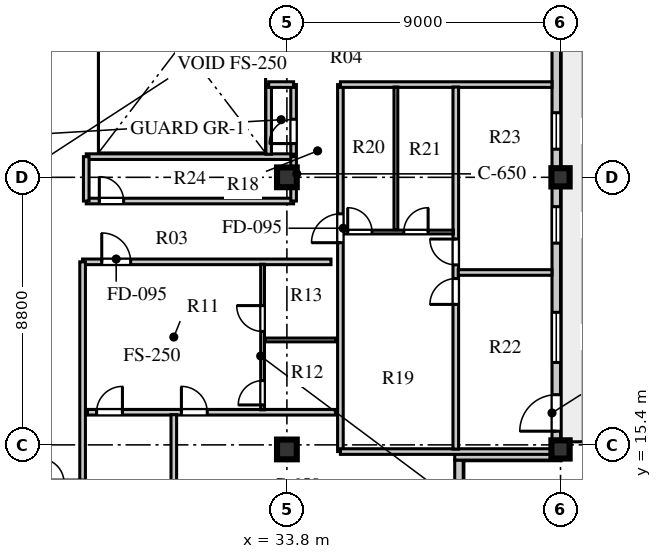
"""IFC4 building model, lengths in metres.
Left out: names, types, materials, properties, quantities, classifications, styles, units other than length and angle.
Written with IfcOpenShell. Run it as: python <this file> out.ifc"""

import sys

from ifc_helpers import new_model, si_unit, direction, frame, frame_2d, origin, origin_2d, place, context, subcontext, project, spatial, rectangle, extrude, element, fill, save


model = new_model("IFC4")
c1 = context("Model", 3, precision=1e-05, world=origin(), true_north=direction((0.0, 1.0)))
c2 = subcontext(c1, "Body", "Model", "MODEL_VIEW")
j1 = project(units=[si_unit("LENGTHUNIT", "METRE"), si_unit("PLANEANGLEUNIT", "RADIAN")], contexts=[c1])
p1 = place(None, origin())
s1 = spatial("IfcSite", under=j1, at=p1, CompositionType="ELEMENT")
p2 = place(p1, origin())
s2 = spatial("IfcBuilding", under=s1, at=p2, CompositionType="ELEMENT")
p3 = place(p2, frame((0.0, 0.0, 342.9)))
s3 = spatial("IfcBuildingStorey", under=s2, at=p3, CompositionType="ELEMENT", Elevation=342.9)
for number, where, z_axis, x_axis in (
    (1, (33.8, 15.25, 0.0), (0.0, 0.0, 1.0), (1.0, 0.0, 0.0)),
    (2, (33.8, 24.2, 0.0), (0.0, 0.0, 1.0), (1.0, 0.0, 0.0)),
):
    element("IfcColumn", number, at=place(p3, frame(where, z_axis=z_axis, x_axis=x_axis)), inside=s3, PredefinedType="COLUMN", context=c2, shape_type="SweptSolid", body=[
        extrude(rectangle(XDim=0.65, YDim=0.65, at=origin_2d()), origin(), (0.0, 0.0, 1.0), 3.55),
    ])
for number, where, z_axis, x_axis in (
    (3, (42.8, 15.25, 0.0), (0.0, 0.0, 1.0), (1.0, 0.0, 0.0)),
    (4, (42.8, 24.2, 0.0), (0.0, 0.0, 1.0), (1.0, 0.0, 0.0)),
):
    element("IfcColumn", number, at=place(p3, frame(where, z_axis=z_axis, x_axis=x_axis)), inside=s3, PredefinedType="COLUMN", context=c2, shape_type="SweptSolid", body=[
        extrude(rectangle(XDim=0.6, YDim=0.6, at=origin_2d()), origin(), (0.0, 0.0, 1.0), 3.55),
    ])
p4 = place(p3, frame((39.46, 11.98, 0.0), z_axis=(0.0, 0.0, 1.0), x_axis=(0.0, 1.0, 0.0)))
e5 = element("IfcWall", 5, at=p4, inside=s3, PredefinedType="STANDARD", context=c2, shape_type="SweptSolid", body=[
    extrude(rectangle(XDim=2.92, YDim=0.28, at=frame_2d((1.46, 0.0))), origin(), (0.0, 0.0, 1.0), 2.91),
])
p5 = place(p3, frame((39.32, 15.04, 0.0), z_axis=(0.0, 0.0, 1.0), x_axis=(1.0, 0.0, 0.0)))
e6 = element("IfcWall", 6, at=p5, inside=s3, PredefinedType="STANDARD", context=c2, shape_type="SweptSolid", body=[
    extrude(rectangle(XDim=3.48, YDim=0.28, at=frame_2d((1.74, 0.0))), origin(), (0.0, 0.0, 1.0), 2.91),
])
p6 = place(p3, frame((42.66, 15.18, 0.0), z_axis=(0.0, 0.0, 1.0), x_axis=(0.0, 1.0, 0.0)))
e7 = element("IfcWall", 7, at=p6, inside=s3, PredefinedType="STANDARD", context=c2, shape_type="SweptSolid", body=[
    extrude(rectangle(XDim=26.84, YDim=0.28, at=frame_2d((13.42, 0.0))), origin(), (0.0, 0.0, 1.0), 2.91),
])
p7 = place(p6, frame((0.67, 0.0, 0.0)))
e8 = element("IfcOpeningElement", 8, at=p7, cuts=e7, PredefinedType="OPENING", context=c2, shape_type="SweptSolid", body=[
    extrude(rectangle(XDim=1.2, YDim=2.05, at=frame_2d((0.6, 1.025))), frame((0.0, 0.15, 0.0), z_axis=(0.0, -1.0, 0.0), x_axis=(1.0, 0.0, 0.0)), (0.0, 0.0, 1.0), 0.3),
])
p8 = place(p6, frame((2.93, 0.0, 0.8)))
e9 = element("IfcOpeningElement", 9, at=p8, cuts=e7, PredefinedType="OPENING", context=c2, shape_type="SweptSolid", body=[
    extrude(rectangle(XDim=1.65, YDim=1.95, at=frame_2d((0.825, 0.975))), frame((0.0, 0.15, 0.0), z_axis=(0.0, -1.0, 0.0), x_axis=(1.0, 0.0, 0.0)), (0.0, 0.0, 1.0), 0.3),
])
p9 = place(p6, frame((6.855, 0.0, 0.8)))
e10 = element("IfcOpeningElement", 10, at=p9, cuts=e7, PredefinedType="OPENING", context=c2, shape_type="SweptSolid", body=[
    extrude(rectangle(XDim=1.2, YDim=1.75, at=frame_2d((0.6, 0.875))), frame((0.0, 0.15, 0.0), z_axis=(0.0, -1.0, 0.0), x_axis=(1.0, 0.0, 0.0)), (0.0, 0.0, 1.0), 0.3),
])
p10 = place(p6, frame((9.945, 0.0, 0.8)))
e11 = element("IfcOpeningElement", 11, at=p10, cuts=e7, PredefinedType="OPENING", context=c2, shape_type="SweptSolid", body=[
    extrude(rectangle(XDim=1.2, YDim=1.75, at=frame_2d((0.6, 0.875))), frame((0.0, 0.15, 0.0), z_axis=(0.0, -1.0, 0.0), x_axis=(1.0, 0.0, 0.0)), (0.0, 0.0, 1.0), 0.3),
])
p11 = place(p6, frame((14.85, 0.0, 0.8)))
e12 = element("IfcOpeningElement", 12, at=p11, cuts=e7, PredefinedType="OPENING", context=c2, shape_type="SweptSolid", body=[
    extrude(rectangle(XDim=1.8, YDim=2.0, at=frame_2d((0.9, 1.0))), frame((0.0, 0.15, 0.0), z_axis=(0.0, -1.0, 0.0), x_axis=(1.0, 0.0, 0.0)), (0.0, 0.0, 1.0), 0.3),
])
p12 = place(p6, frame((21.645, 0.0, 0.8)))
e13 = element("IfcOpeningElement", 13, at=p12, cuts=e7, PredefinedType="OPENING", context=c2, shape_type="SweptSolid", body=[
    extrude(rectangle(XDim=1.5, YDim=2.0, at=frame_2d((0.75, 1.0))), frame((0.0, 0.15, 0.0), z_axis=(0.0, -1.0, 0.0), x_axis=(1.0, 0.0, 0.0)), (0.0, 0.0, 1.0), 0.3),
])
p13 = place(p3, frame((27.08, 21.42, 0.0), z_axis=(0.0, 0.0, 1.0), x_axis=(1.0, 0.0, 0.0)))
e14 = element("IfcWall", 14, at=p13, inside=s3, PredefinedType="SOLIDWALL", context=c2, shape_type="SweptSolid", body=[
    extrude(rectangle(XDim=8.17, YDim=0.185, at=frame_2d((4.085, 0.0))), origin(), (0.0, 0.0, 1.0), 3.25),
])
p14 = place(p13, frame((0.63, 0.0, 0.0)))
e15 = element("IfcOpeningElement", 15, at=p14, cuts=e14, PredefinedType="OPENING", context=c2, shape_type="SweptSolid", body=[
    extrude(rectangle(XDim=0.95, YDim=2.1, at=frame_2d((0.475, 1.05))), frame((0.0, 0.103, 0.0), z_axis=(0.0, -1.0, 0.0), x_axis=(1.0, 0.0, 0.0)), (0.0, 0.0, 1.0), 0.205),
])
p15 = place(p3, frame((27.08, 11.98, 0.0), z_axis=(0.0, 0.0, 1.0), x_axis=(0.0, 1.0, 0.0)))
e16 = element("IfcWall", 16, at=p15, inside=s3, PredefinedType="SOLIDWALL", context=c2, shape_type="SweptSolid", body=[
    extrude(rectangle(XDim=9.44, YDim=0.185, at=frame_2d((4.72, 0.0))), origin(), (0.0, 0.0, 1.0), 3.55),
])
p16 = place(p3, frame((27.24, 16.473, 0.0), z_axis=(0.0, 0.0, 1.0), x_axis=(1.0, 0.0, 0.0)))
e17 = element("IfcWall", 17, at=p16, inside=s3, PredefinedType="SOLIDWALL", context=c2, shape_type="SweptSolid", body=[
    extrude(rectangle(XDim=8.16, YDim=0.185, at=frame_2d((4.08, 0.0))), origin(), (0.0, 0.0, 1.0), 3.55),
])
p17 = place(p16, frame((0.3, 0.0, 0.0)))
e18 = element("IfcOpeningElement", 18, at=p17, cuts=e17, PredefinedType="OPENING", context=c2, shape_type="SweptSolid", body=[
    extrude(rectangle(XDim=0.85, YDim=2.08, at=frame_2d((0.425, 1.04))), frame((0.0, 0.103, 0.0), z_axis=(0.0, -1.0, 0.0), x_axis=(1.0, 0.0, 0.0)), (0.0, 0.0, 1.0), 0.205),
])
p18 = place(p16, frame((3.09, 0.0, 0.0)))
e19 = element("IfcOpeningElement", 19, at=p18, cuts=e17, PredefinedType="OPENING", context=c2, shape_type="SweptSolid", body=[
    extrude(rectangle(XDim=0.85, YDim=2.08, at=frame_2d((0.425, 1.04))), frame((0.0, 0.103, 0.0), z_axis=(0.0, -1.0, 0.0), x_axis=(1.0, 0.0, 0.0)), (0.0, 0.0, 1.0), 0.205),
])
p19 = place(p3, frame((33.0, 16.553, 0.0), z_axis=(0.0, 0.0, 1.0), x_axis=(0.0, 1.0, 0.0)))
e20 = element("IfcWall", 20, at=p19, inside=s3, PredefinedType="PLUMBINGWALL", context=c2, shape_type="SweptSolid", body=[
    extrude(rectangle(XDim=4.787, YDim=0.125, at=frame_2d((2.394, 0.0))), origin(), (0.0, 0.0, 1.0), 3.55),
])
p20 = place(p19, frame((0.16, 0.0, 0.0)))
e21 = element("IfcOpeningElement", 21, at=p20, cuts=e20, PredefinedType="OPENING", context=c2, shape_type="SweptSolid", body=[
    extrude(rectangle(XDim=0.8, YDim=2.05, at=frame_2d((0.4, 1.025))), frame((0.0, 0.073, 0.0), z_axis=(0.0, -1.0, 0.0), x_axis=(1.0, 0.0, 0.0)), (0.0, 0.0, 1.0), 0.145),
])
p21 = place(p19, frame((2.578, 0.0, 0.0)))
e22 = element("IfcOpeningElement", 22, at=p21, cuts=e20, PredefinedType="OPENING", context=c2, shape_type="SweptSolid", body=[
    extrude(rectangle(XDim=0.85, YDim=2.08, at=frame_2d((0.425, 1.04))), frame((0.0, 0.073, 0.0), z_axis=(0.0, -1.0, 0.0), x_axis=(1.0, 0.0, 0.0)), (0.0, 0.0, 1.0), 0.145),
])
p22 = place(p3, frame((33.08, 18.851, 0.0), z_axis=(0.0, 0.0, 1.0), x_axis=(1.0, 0.0, 0.0)))
e23 = element("IfcWall", 23, at=p22, inside=s3, PredefinedType="PLUMBINGWALL", context=c2, shape_type="SweptSolid", body=[
    extrude(rectangle(XDim=2.32, YDim=0.125, at=frame_2d((1.16, 0.0))), origin(), (0.0, 0.0, 1.0), 3.55),
])
p23 = place(p3, frame((30.08, 11.98, 0.0), z_axis=(0.0, 0.0, 1.0), x_axis=(0.0, 1.0, 0.0)))
e24 = element("IfcWall", 24, at=p23, inside=s3, PredefinedType="SOLIDWALL", context=c2, shape_type="SweptSolid", body=[
    extrude(rectangle(XDim=4.413, YDim=0.185, at=frame_2d((2.207, 0.0))), origin(), (0.0, 0.0, 1.0), 3.55),
])
p24 = place(p3, frame((35.56, 15.18, 0.0), z_axis=(0.0, 0.0, 1.0), x_axis=(0.0, 1.0, 0.0)))
e25 = element("IfcWall", 25, at=p24, inside=s3, PredefinedType="SOLIDWALL", context=c2, shape_type="SweptSolid", body=[
    extrude(rectangle(XDim=12.07, YDim=0.185, at=frame_2d((6.035, 0.0))), origin(), (0.0, 0.0, 1.0), 3.55),
])
p25 = place(p24, frame((6.87, 0.0, 0.0)))
e26 = element("IfcOpeningElement", 26, at=p25, cuts=e25, PredefinedType="OPENING", context=c2, shape_type="SweptSolid", body=[
    extrude(rectangle(XDim=0.95, YDim=2.1, at=frame_2d((0.475, 1.05))), frame((0.0, 0.103, 0.0), z_axis=(0.0, -1.0, 0.0), x_axis=(1.0, 0.0, 0.0)), (0.0, 0.0, 1.0), 0.205),
])
p26 = place(p3, frame((35.56, 15.18, 0.0), z_axis=(0.0, 0.0, 1.0), x_axis=(1.0, 0.0, 0.0)))
e27 = element("IfcWall", 27, at=p26, inside=s3, PredefinedType="SOLIDWALL", context=c2, shape_type="SweptSolid", body=[
    extrude(rectangle(XDim=6.96, YDim=0.185, at=frame_2d((3.48, 0.0))), origin(), (0.0, 0.0, 1.0), 3.1),
])
p27 = place(p3, frame((35.56, 27.25, 0.0), z_axis=(0.0, 0.0, 1.0), x_axis=(1.0, 0.0, 0.0)))
e28 = element("IfcWall", 28, at=p27, inside=s3, PredefinedType="SOLIDWALL", context=c2, shape_type="SweptSolid", body=[
    extrude(rectangle(XDim=6.96, YDim=0.185, at=frame_2d((3.48, 0.0))), origin(), (0.0, 0.0, 1.0), 3.55),
])
p28 = place(p3, frame((39.355, 15.26, 0.0), z_axis=(0.0, 0.0, 1.0), x_axis=(0.0, 1.0, 0.0)))
e29 = element("IfcWall", 29, at=p28, inside=s3, PredefinedType="SOLIDWALL", context=c2, shape_type="SweptSolid", body=[
    extrude(rectangle(XDim=11.91, YDim=0.185, at=frame_2d((5.955, 0.0))), origin(), (0.0, 0.0, 1.0), 3.55),
])
p29 = place(p28, frame((4.76, 0.0, 0.0)))
e30 = element("IfcOpeningElement", 30, at=p29, cuts=e29, PredefinedType="OPENING", context=c2, shape_type="SweptSolid", body=[
    extrude(rectangle(XDim=0.85, YDim=2.08, at=frame_2d((0.425, 1.04))), frame((0.0, 0.103, 0.0), z_axis=(0.0, -1.0, 0.0), x_axis=(1.0, 0.0, 0.0)), (0.0, 0.0, 1.0), 0.205),
])
p30 = place(p28, frame((6.06, 0.0, 0.0)))
e31 = element("IfcOpeningElement", 31, at=p30, cuts=e29, PredefinedType="OPENING", context=c2, shape_type="SweptSolid", body=[
    extrude(rectangle(XDim=0.85, YDim=2.08, at=frame_2d((0.425, 1.04))), frame((0.0, 0.103, 0.0), z_axis=(0.0, -1.0, 0.0), x_axis=(1.0, 0.0, 0.0)), (0.0, 0.0, 1.0), 0.205),
])
p31 = place(p3, frame((35.64, 22.4, 0.0), z_axis=(0.0, 0.0, 1.0), x_axis=(1.0, 0.0, 0.0)))
e32 = element("IfcWall", 32, at=p31, inside=s3, PredefinedType="PLUMBINGWALL", context=c2, shape_type="SweptSolid", body=[
    extrude(rectangle(XDim=3.635, YDim=0.125, at=frame_2d((1.817, 0.0))), origin(), (0.0, 0.0, 1.0), 3.55),
])
p32 = place(p31, frame((0.16, 0.0, 0.0)))
e33 = element("IfcOpeningElement", 33, at=p32, cuts=e32, PredefinedType="OPENING", context=c2, shape_type="SweptSolid", body=[
    extrude(rectangle(XDim=0.8, YDim=2.05, at=frame_2d((0.4, 1.025))), frame((0.0, 0.073, 0.0), z_axis=(0.0, -1.0, 0.0), x_axis=(1.0, 0.0, 0.0)), (0.0, 0.0, 1.0), 0.145),
])
p33 = place(p31, frame((2.005, 0.0, 0.0)))
e34 = element("IfcOpeningElement", 34, at=p33, cuts=e32, PredefinedType="OPENING", context=c2, shape_type="SweptSolid", body=[
    extrude(rectangle(XDim=0.8, YDim=2.05, at=frame_2d((0.4, 1.025))), frame((0.0, 0.073, 0.0), z_axis=(0.0, -1.0, 0.0), x_axis=(1.0, 0.0, 0.0)), (0.0, 0.0, 1.0), 0.145),
])
p34 = place(p3, frame((37.385, 22.48, 0.0), z_axis=(0.0, 0.0, 1.0), x_axis=(0.0, 1.0, 0.0)))
e35 = element("IfcWall", 35, at=p34, inside=s3, PredefinedType="PLUMBINGWALL", context=c2, shape_type="SweptSolid", body=[
    extrude(rectangle(XDim=4.69, YDim=0.125, at=frame_2d((2.345, 0.0))), origin(), (0.0, 0.0, 1.0), 3.55),
])
p35 = place(p3, frame((39.435, 21.07, 0.0), z_axis=(0.0, 0.0, 1.0), x_axis=(1.0, 0.0, 0.0)))
e36 = element("IfcWall", 36, at=p35, inside=s3, PredefinedType="SOLIDWALL", context=c2, shape_type="SweptSolid", body=[
    extrude(rectangle(XDim=3.085, YDim=0.185, at=frame_2d((1.542, 0.0))), origin(), (0.0, 0.0, 1.0), 3.55),
])
p36 = place(p3, frame((27.2, 23.42, 0.0), z_axis=(0.0, 0.0, 1.0), x_axis=(1.0, 0.0, 0.0)))
e37 = element("IfcWall", 37, at=p36, inside=s3, PredefinedType="SOLIDWALL", context=c2, shape_type="SweptSolid", body=[
    extrude(rectangle(XDim=6.82, YDim=0.185, at=frame_2d((3.41, 0.0))), origin(), (0.0, 0.0, 1.0), 3.55),
])
p37 = place(p36, frame((0.43, 0.0, 0.0)))
e38 = element("IfcOpeningElement", 38, at=p37, cuts=e37, PredefinedType="OPENING", context=c2, shape_type="SweptSolid", body=[
    extrude(rectangle(XDim=0.8, YDim=2.05, at=frame_2d((0.4, 1.025))), frame((0.0, 0.103, 0.0), z_axis=(0.0, -1.0, 0.0), x_axis=(1.0, 0.0, 0.0)), (0.0, 0.0, 1.0), 0.205),
])
p38 = place(p3, frame((27.2, 24.88, 0.0), z_axis=(0.0, 0.0, 1.0), x_axis=(1.0, 0.0, 0.0)))
e39 = element("IfcWall", 39, at=p38, inside=s3, PredefinedType="SOLIDWALL", context=c2, shape_type="SweptSolid", body=[
    extrude(rectangle(XDim=6.82, YDim=0.185, at=frame_2d((3.41, 0.0))), origin(), (0.0, 0.0, 1.0), 3.0),
])
p39 = place(p3, frame((27.2, 23.42, 0.0), z_axis=(0.0, 0.0, 1.0), x_axis=(0.0, 1.0, 0.0)))
e40 = element("IfcWall", 40, at=p39, inside=s3, PredefinedType="SOLIDWALL", context=c2, shape_type="SweptSolid", body=[
    extrude(rectangle(XDim=1.46, YDim=0.185, at=frame_2d((0.73, 0.0))), origin(), (0.0, 0.0, 1.0), 3.55),
])
p40 = place(p3, frame((34.02, 23.42, 0.0), z_axis=(0.0, 0.0, 1.0), x_axis=(0.0, 1.0, 0.0)))
e41 = element("IfcWall", 41, at=p40, inside=s3, PredefinedType="SOLIDWALL", context=c2, shape_type="SweptSolid", body=[
    extrude(rectangle(XDim=1.46, YDim=0.185, at=frame_2d((0.73, 0.0))), origin(), (0.0, 0.0, 1.0), 2.95),
])
p41 = place(p3, frame((33.2, 24.96, 0.0), z_axis=(0.0, 0.0, 1.0), x_axis=(0.0, 1.0, 0.0)))
e42 = element("IfcWall", 42, at=p41, inside=s3, PredefinedType="SOLIDWALL", context=c2, shape_type="SweptSolid", body=[
    extrude(rectangle(XDim=2.29, YDim=0.185, at=frame_2d((1.145, 0.0))), origin(), (0.0, 0.0, 1.0), 3.0),
])
p42 = place(p3, frame((34.02, 24.96, 0.0), z_axis=(0.0, 0.0, 1.0), x_axis=(0.0, 1.0, 0.0)))
e43 = element("IfcWall", 43, at=p42, inside=s3, PredefinedType="SOLIDWALL", context=c2, shape_type="SweptSolid", body=[
    extrude(rectangle(XDim=2.29, YDim=0.185, at=frame_2d((1.145, 0.0))), origin(), (0.0, 0.0, 1.0), 2.95),
])
p43 = place(p42, frame((0.35, 0.0, 0.0)))
e44 = element("IfcOpeningElement", 44, at=p43, cuts=e43, PredefinedType="OPENING", context=c2, shape_type="SweptSolid", body=[
    extrude(rectangle(XDim=0.8, YDim=2.05, at=frame_2d((0.4, 1.025))), frame((0.0, 0.103, 0.0), z_axis=(0.0, -1.0, 0.0), x_axis=(1.0, 0.0, 0.0)), (0.0, 0.0, 1.0), 0.205),
])
p44 = place(p3, frame((33.2, 27.25, 0.0), z_axis=(0.0, 0.0, 1.0), x_axis=(1.0, 0.0, 0.0)))
e45 = element("IfcWall", 45, at=p44, inside=s3, PredefinedType="SOLIDWALL", context=c2, shape_type="SweptSolid", body=[
    extrude(rectangle(XDim=0.82, YDim=0.185, at=frame_2d((0.41, 0.0))), origin(), (0.0, 0.0, 1.0), 3.55),
])
p45 = place(p7, frame((1.2, 0.0, 0.0), z_axis=(0.0, 0.0, 1.0), x_axis=(-1.0, 0.0, 0.0)))
e46 = element("IfcDoor", 46, at=p45, inside=s3, OperationType="SINGLE_SWING_RIGHT", PredefinedType="DOOR", context=c2, shape_type="SweptSolid", body=[
    extrude(rectangle(XDim=1.2, YDim=2.05, at=frame_2d((0.6, 1.025))), frame((0.0, 0.025, 0.0), z_axis=(0.0, -1.0, 0.0), x_axis=(1.0, 0.0, 0.0)), (0.0, 0.0, 1.0), 0.05),
])
fill(e8, e46)
p46 = place(p8, origin())
e47 = element("IfcWindow", 47, at=p46, inside=s3, PartitioningType="SINGLE_PANEL", PredefinedType="WINDOW", context=c2, shape_type="SweptSolid", body=[
    extrude(rectangle(XDim=1.65, YDim=1.95, at=frame_2d((0.825, 0.975))), frame((0.0, 0.03, 0.0), z_axis=(0.0, -1.0, 0.0), x_axis=(1.0, 0.0, 0.0)), (0.0, 0.0, 1.0), 0.06),
])
fill(e9, e47)
p47 = place(p9, origin())
e48 = element("IfcWindow", 48, at=p47, inside=s3, PartitioningType="SINGLE_PANEL", PredefinedType="WINDOW", context=c2, shape_type="SweptSolid", body=[
    extrude(rectangle(XDim=1.2, YDim=1.75, at=frame_2d((0.6, 0.875))), frame((0.0, 0.03, 0.0), z_axis=(0.0, -1.0, 0.0), x_axis=(1.0, 0.0, 0.0)), (0.0, 0.0, 1.0), 0.06),
])
fill(e10, e48)
p48 = place(p10, origin())
e49 = element("IfcWindow", 49, at=p48, inside=s3, PartitioningType="SINGLE_PANEL", PredefinedType="WINDOW", context=c2, shape_type="SweptSolid", body=[
    extrude(rectangle(XDim=1.2, YDim=1.75, at=frame_2d((0.6, 0.875))), frame((0.0, 0.03, 0.0), z_axis=(0.0, -1.0, 0.0), x_axis=(1.0, 0.0, 0.0)), (0.0, 0.0, 1.0), 0.06),
])
fill(e11, e49)
p49 = place(p20, origin())
e50 = element("IfcDoor", 50, at=p49, inside=s3, OperationType="SINGLE_SWING_LEFT", PredefinedType="DOOR", context=c2, shape_type="SweptSolid", body=[
    extrude(rectangle(XDim=0.8, YDim=2.05, at=frame_2d((0.4, 1.025))), frame((0.0, 0.025, 0.0), z_axis=(0.0, -1.0, 0.0), x_axis=(1.0, 0.0, 0.0)), (0.0, 0.0, 1.0), 0.05),
])
fill(e21, e50)
p50 = place(p21, origin())
e51 = element("IfcDoor", 51, at=p50, inside=s3, OperationType="SINGLE_SWING_RIGHT", PredefinedType="DOOR", context=c2, shape_type="SweptSolid", body=[
    extrude(rectangle(XDim=0.85, YDim=2.08, at=frame_2d((0.425, 1.04))), frame((0.0, 0.025, 0.0), z_axis=(0.0, -1.0, 0.0), x_axis=(1.0, 0.0, 0.0)), (0.0, 0.0, 1.0), 0.05),
])
fill(e22, e51)
p51 = place(p17, frame((0.85, 0.0, 0.0), z_axis=(0.0, 0.0, 1.0), x_axis=(-1.0, 0.0, 0.0)))
e52 = element("IfcDoor", 52, at=p51, inside=s3, OperationType="SINGLE_SWING_LEFT", PredefinedType="DOOR", context=c2, shape_type="SweptSolid", body=[
    extrude(rectangle(XDim=0.85, YDim=2.08, at=frame_2d((0.425, 1.04))), frame((0.0, 0.025, 0.0), z_axis=(0.0, -1.0, 0.0), x_axis=(1.0, 0.0, 0.0)), (0.0, 0.0, 1.0), 0.05),
])
fill(e18, e52)
p52 = place(p18, frame((0.85, 0.0, 0.0), z_axis=(0.0, 0.0, 1.0), x_axis=(-1.0, 0.0, 0.0)))
e53 = element("IfcDoor", 53, at=p52, inside=s3, OperationType="SINGLE_SWING_RIGHT", PredefinedType="DOOR", context=c2, shape_type="SweptSolid", body=[
    extrude(rectangle(XDim=0.85, YDim=2.08, at=frame_2d((0.425, 1.04))), frame((0.0, 0.025, 0.0), z_axis=(0.0, -1.0, 0.0), x_axis=(1.0, 0.0, 0.0)), (0.0, 0.0, 1.0), 0.05),
])
fill(e19, e53)
p53 = place(p14, frame((0.95, 0.0, 0.0), z_axis=(0.0, 0.0, 1.0), x_axis=(-1.0, 0.0, 0.0)))
e54 = element("IfcDoor", 54, at=p53, inside=s3, OperationType="SINGLE_SWING_RIGHT", PredefinedType="DOOR", context=c2, shape_type="SweptSolid", body=[
    extrude(rectangle(XDim=0.95, YDim=2.1, at=frame_2d((0.475, 1.05))), frame((0.0, 0.025, 0.0), z_axis=(0.0, -1.0, 0.0), x_axis=(1.0, 0.0, 0.0)), (0.0, 0.0, 1.0), 0.05),
])
fill(e15, e54)
p54 = place(p32, origin())
e55 = element("IfcDoor", 55, at=p54, inside=s3, OperationType="SINGLE_SWING_LEFT", PredefinedType="DOOR", context=c2, shape_type="SweptSolid", body=[
    extrude(rectangle(XDim=0.8, YDim=2.05, at=frame_2d((0.4, 1.025))), frame((0.0, 0.025, 0.0), z_axis=(0.0, -1.0, 0.0), x_axis=(1.0, 0.0, 0.0)), (0.0, 0.0, 1.0), 0.05),
])
fill(e33, e55)
p55 = place(p33, origin())
e56 = element("IfcDoor", 56, at=p55, inside=s3, OperationType="SINGLE_SWING_RIGHT", PredefinedType="DOOR", context=c2, shape_type="SweptSolid", body=[
    extrude(rectangle(XDim=0.8, YDim=2.05, at=frame_2d((0.4, 1.025))), frame((0.0, 0.025, 0.0), z_axis=(0.0, -1.0, 0.0), x_axis=(1.0, 0.0, 0.0)), (0.0, 0.0, 1.0), 0.05),
])
fill(e34, e56)
p56 = place(p29, origin())
e57 = element("IfcDoor", 57, at=p56, inside=s3, OperationType="SINGLE_SWING_LEFT", PredefinedType="DOOR", context=c2, shape_type="SweptSolid", body=[
    extrude(rectangle(XDim=0.85, YDim=2.08, at=frame_2d((0.425, 1.04))), frame((0.0, 0.025, 0.0), z_axis=(0.0, -1.0, 0.0), x_axis=(1.0, 0.0, 0.0)), (0.0, 0.0, 1.0), 0.05),
])
fill(e30, e57)
p57 = place(p30, origin())
e58 = element("IfcDoor", 58, at=p57, inside=s3, OperationType="SINGLE_SWING_RIGHT", PredefinedType="DOOR", context=c2, shape_type="SweptSolid", body=[
    extrude(rectangle(XDim=0.85, YDim=2.08, at=frame_2d((0.425, 1.04))), frame((0.0, 0.025, 0.0), z_axis=(0.0, -1.0, 0.0), x_axis=(1.0, 0.0, 0.0)), (0.0, 0.0, 1.0), 0.05),
])
fill(e31, e58)
p58 = place(p25, origin())
e59 = element("IfcDoor", 59, at=p58, inside=s3, OperationType="SINGLE_SWING_LEFT", PredefinedType="DOOR", context=c2, shape_type="SweptSolid", body=[
    extrude(rectangle(XDim=0.95, YDim=2.1, at=frame_2d((0.475, 1.05))), frame((0.0, 0.025, 0.0), z_axis=(0.0, -1.0, 0.0), x_axis=(1.0, 0.0, 0.0)), (0.0, 0.0, 1.0), 0.05),
])
fill(e26, e59)
p59 = place(p37, origin())
e60 = element("IfcDoor", 60, at=p59, inside=s3, OperationType="SINGLE_SWING_LEFT", PredefinedType="DOOR", context=c2, shape_type="SweptSolid", body=[
    extrude(rectangle(XDim=0.8, YDim=2.05, at=frame_2d((0.4, 1.025))), frame((0.0, 0.025, 0.0), z_axis=(0.0, -1.0, 0.0), x_axis=(1.0, 0.0, 0.0)), (0.0, 0.0, 1.0), 0.05),
])
fill(e38, e60)
p60 = place(p43, origin())
e61 = element("IfcDoor", 61, at=p60, inside=s3, OperationType="SINGLE_SWING_LEFT", PredefinedType="DOOR", context=c2, shape_type="SweptSolid", body=[
    extrude(rectangle(XDim=0.8, YDim=2.05, at=frame_2d((0.4, 1.025))), frame((0.0, 0.025, 0.0), z_axis=(0.0, -1.0, 0.0), x_axis=(1.0, 0.0, 0.0)), (0.0, 0.0, 1.0), 0.05),
])
fill(e44, e61)
save(model, sys.argv[1])
